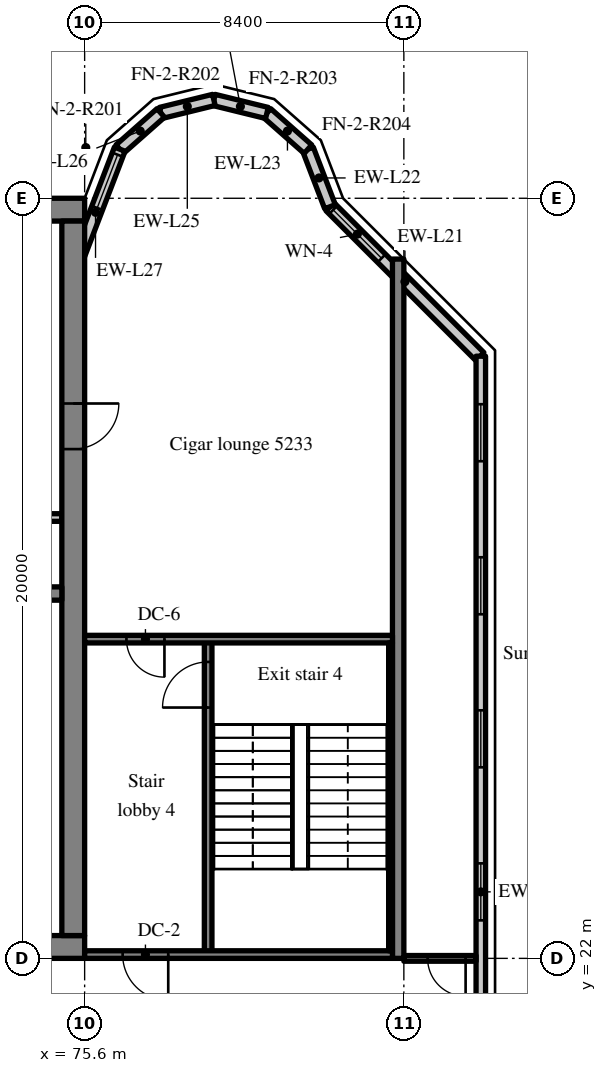
"""IFC4 building model, lengths in metres.
Left out: names, types, materials, properties, quantities, classifications, styles, units other than length and angle.
Written with IfcOpenShell. Run it as: python <this file> out.ifc"""

import sys

from ifc_helpers import new_model, si_unit, direction, frame, frame_2d, origin, place, context, subcontext, project, spatial, rectangle, extrude, source, transform, mapped, element, fill, save


model = new_model("IFC4")
c1 = context("Model", 3, precision=1e-05, world=origin(), true_north=direction((0.0, 1.0)))
c2 = subcontext(c1, "Body", "Model", "MODEL_VIEW")
j1 = project(units=[si_unit("LENGTHUNIT", "METRE"), si_unit("PLANEANGLEUNIT", "RADIAN")], contexts=[c1])
p1 = place(None, origin())
s1 = spatial("IfcSite", under=j1, at=p1, CompositionType="ELEMENT")
p2 = place(p1, origin())
s2 = spatial("IfcBuilding", under=s1, at=p2, CompositionType="ELEMENT")
p3 = place(p2, frame((0.0, 0.0, 217.9)))
s3 = spatial("IfcBuildingStorey", under=s2, at=p3, CompositionType="ELEMENT", Elevation=217.9)
m1 = source(origin(), c2, "Body", "SweptSolid", [
    extrude(rectangle(XDim=50.4, YDim=0.6, at=frame_2d((25.2, 0.0))), origin(), (0.0, 0.0, 1.0), 3.62),
])
p4 = place(p3, frame((25.2, 22.3, 0.0), z_axis=(0.0, 0.0, 1.0), x_axis=(1.0, 0.0, 0.0)))
e1 = element("IfcWall", 1, at=p4, inside=s3, PredefinedType="SHEAR", context=c2, shape_type="MappedRepresentation", body=[
    mapped(m1, transform((0.0, 0.0, 0.0), scale=1.0)),
])
m2 = source(origin(), c2, "Body", "SweptSolid", [
    extrude(rectangle(XDim=1.8, YDim=2.1, at=frame_2d((0.9, 1.05))), frame((0.0, 0.31, 0.0), z_axis=(0.0, -1.0, 0.0), x_axis=(1.0, 0.0, 0.0)), (0.0, 0.0, 1.0), 0.62),
])
p5 = place(p4, frame((15.9, 0.0, 0.0)))
e2 = element("IfcOpeningElement", 2, at=p5, cuts=e1, PredefinedType="OPENING", context=c2, shape_type="MappedRepresentation", body=[
    mapped(m2, transform((0.0, 0.0, 0.0), scale=1.0)),
])
m3 = source(origin(), c2, "Body", "SweptSolid", [
    extrude(rectangle(XDim=0.9, YDim=2.1, at=frame_2d((0.45, 1.05))), frame((0.0, 0.31, 0.0), z_axis=(0.0, -1.0, 0.0), x_axis=(1.0, 0.0, 0.0)), (0.0, 0.0, 1.0), 0.62),
])
p6 = place(p4, frame((9.687, 0.0, 0.0)))
e3 = element("IfcOpeningElement", 3, at=p6, cuts=e1, PredefinedType="OPENING", context=c2, shape_type="MappedRepresentation", body=[
    mapped(m3, transform((0.0, 0.0, 0.0), scale=1.0)),
])
p7 = place(p4, frame((21.513, 0.0, 0.0)))
e4 = element("IfcOpeningElement", 4, at=p7, cuts=e1, PredefinedType="OPENING", context=c2, shape_type="MappedRepresentation", body=[
    mapped(m3, transform((0.0, 0.0, 0.0), scale=1.0)),
])
p8 = place(p4, frame((32.7, 0.0, 0.0)))
e5 = element("IfcOpeningElement", 5, at=p8, cuts=e1, PredefinedType="OPENING", context=c2, shape_type="MappedRepresentation", body=[
    mapped(m2, transform((0.0, 0.0, 0.0), scale=1.0)),
])
m4 = source(origin(), c2, "Body", "SweptSolid", [
    extrude(rectangle(XDim=1.2, YDim=2.1, at=frame_2d((0.6, 1.05))), frame((0.0, 0.31, 0.0), z_axis=(0.0, -1.0, 0.0), x_axis=(1.0, 0.0, 0.0)), (0.0, 0.0, 1.0), 0.62),
])
p9 = place(p4, frame((6.488, 0.0, 0.0)))
e6 = element("IfcOpeningElement", 6, at=p9, cuts=e1, PredefinedType="OPENING", context=c2, shape_type="MappedRepresentation", body=[
    mapped(m4, transform((0.0, 0.0, 0.0), scale=1.0)),
])
p10 = place(p4, frame((47.925, 0.0, 0.0)))
e7 = element("IfcOpeningElement", 7, at=p10, cuts=e1, PredefinedType="OPENING", context=c2, shape_type="MappedRepresentation", body=[
    mapped(m4, transform((0.0, 0.0, 0.0), scale=1.0)),
])
p11 = place(p3, frame((25.2, 41.7, 0.0), z_axis=(0.0, 0.0, 1.0), x_axis=(1.0, 0.0, 0.0)))
e8 = element("IfcWall", 8, at=p11, inside=s3, PredefinedType="SHEAR", context=c2, shape_type="MappedRepresentation", body=[
    mapped(m1, transform((0.0, 0.0, 0.0), scale=1.0)),
])
m5 = source(origin(), c2, "Body", "SweptSolid", [
    extrude(rectangle(XDim=18.8, YDim=0.6, at=frame_2d((9.4, 0.0))), origin(), (0.0, 0.0, 1.0), 3.62),
])
p12 = place(p3, frame((75.3, 22.6, 0.0), z_axis=(0.0, 0.0, 1.0), x_axis=(0.0, 1.0, 0.0)))
e9 = element("IfcWall", 9, at=p12, inside=s3, PredefinedType="SHEAR", context=c2, shape_type="MappedRepresentation", body=[
    mapped(m5, transform((0.0, 0.0, 0.0), scale=1.0)),
])
p13 = place(p12, frame((12.8, 0.0, 0.0)))
e10 = element("IfcOpeningElement", 10, at=p13, cuts=e9, PredefinedType="OPENING", context=c2, shape_type="MappedRepresentation", body=[
    mapped(m4, transform((0.0, 0.0, 0.0), scale=1.0)),
])
m6 = source(origin(), c2, "Body", "SweptSolid", [
    extrude(rectangle(XDim=7.625, YDim=0.35, at=frame_2d((3.812, 0.0))), origin(), (0.0, 0.0, 1.0), 3.62),
])
p14 = place(p3, frame((67.375, 31.6, 0.0), z_axis=(0.0, 0.0, 1.0), x_axis=(1.0, 0.0, 0.0)))
e11 = element("IfcWall", 11, at=p14, inside=s3, PredefinedType="SHEAR", context=c2, shape_type="MappedRepresentation", body=[
    mapped(m6, transform((0.0, 0.0, 0.0), scale=1.0)),
])
m7 = source(origin(), c2, "Body", "SweptSolid", [
    extrude(rectangle(XDim=1.1, YDim=2.1, at=frame_2d((0.55, 1.05))), frame((0.0, 0.185, 0.0), z_axis=(0.0, -1.0, 0.0), x_axis=(1.0, 0.0, 0.0)), (0.0, 0.0, 1.0), 0.37),
])
p15 = place(p14, frame((5.8, 0.0, 0.0)))
e12 = element("IfcOpeningElement", 12, at=p15, cuts=e11, PredefinedType="OPENING", context=c2, shape_type="MappedRepresentation", body=[
    mapped(m7, transform((0.0, 0.0, 0.0), scale=1.0)),
])
m8 = source(origin(), c2, "Body", "SweptSolid", [
    extrude(rectangle(XDim=18.4, YDim=0.3, at=frame_2d((9.2, 0.0))), origin(), (0.0, 0.0, 1.0), 3.62),
])
p16 = place(p3, frame((83.85, 22.0, 0.0), z_axis=(0.0, 0.0, 1.0), x_axis=(0.0, 1.0, 0.0)))
e13 = element("IfcWall", 13, at=p16, inside=s3, PredefinedType="SHEAR", context=c2, shape_type="MappedRepresentation", body=[
    mapped(m8, transform((0.0, 0.0, 0.0), scale=1.0)),
])
m9 = source(origin(), c2, "Body", "SweptSolid", [
    extrude(rectangle(XDim=5.576, YDim=0.3, at=frame_2d((2.788, 0.0))), origin(), (0.0, 0.0, 1.0), 3.62),
])
p17 = place(p3, frame((86.0, 37.834, 0.0), z_axis=(0.0, 0.0, 1.0), x_axis=(-0.707106781187, 0.707106781187, 0.0)))
e14 = element("IfcWall", 14, at=p17, inside=s3, PredefinedType="SOLIDWALL", context=c2, shape_type="MappedRepresentation", body=[
    mapped(m9, transform((0.0, 0.0, 0.0), scale=1.0)),
])
m10 = source(origin(), c2, "Body", "SweptSolid", [
    extrude(rectangle(XDim=1.8, YDim=1.5, at=frame_2d((0.9, 0.75))), frame((0.0, 0.16, 0.0), z_axis=(0.0, -1.0, 0.0), x_axis=(1.0, 0.0, 0.0)), (0.0, 0.0, 1.0), 0.32),
])
p18 = place(p17, frame((3.658, 0.0, 0.9)))
e15 = element("IfcOpeningElement", 15, at=p18, cuts=e14, PredefinedType="OPENING", context=c2, shape_type="MappedRepresentation", body=[
    mapped(m10, transform((0.0, 0.0, 0.0), scale=1.0)),
])
m11 = source(origin(), c2, "Body", "SweptSolid", [
    extrude(rectangle(XDim=1.622, YDim=0.3, at=frame_2d((0.811, 0.0))), origin(), (0.0, 0.0, 1.0), 3.62),
])
p19 = place(p3, frame((82.057, 41.777, 0.0), z_axis=(0.0, 0.0, 1.0), x_axis=(-0.357778527068, 0.933806471154, 0.0)))
e16 = element("IfcWall", 16, at=p19, inside=s3, PredefinedType="SOLIDWALL", context=c2, shape_type="MappedRepresentation", body=[
    mapped(m11, transform((0.0, 0.0, 0.0), scale=1.0)),
])
m12 = source(origin(), c2, "Body", "SweptSolid", [
    extrude(rectangle(XDim=1.44, YDim=0.3, at=frame_2d((0.72, 0.0))), origin(), (0.0, 0.0, 1.0), 3.62),
])
p20 = place(p3, frame((81.477, 43.292, 0.0), z_axis=(0.0, 0.0, 1.0), x_axis=(-0.74957555648, 0.661918790432, 0.0)))
e17 = element("IfcWall", 17, at=p20, inside=s3, PredefinedType="SOLIDWALL", context=c2, shape_type="MappedRepresentation", body=[
    mapped(m12, transform((0.0, 0.0, 0.0), scale=1.0)),
])
m13 = source(origin(), c2, "Body", "SweptSolid", [
    extrude(rectangle(XDim=1.439, YDim=0.3, at=frame_2d((0.719, 0.0))), origin(), (0.0, 0.0, 1.0), 3.62),
])
for number, where, z_axis, x_axis in (
    (18, (80.397, 44.245, 0.0), (0.0, 0.0, 1.0), (-0.971, 0.238, 0.0)),
    (19, (79.0, 44.588, 0.0), (0.0, 0.0, 1.0), (-0.971, -0.238, 0.0)),
):
    element("IfcWall", number, at=place(p3, frame(where, z_axis=z_axis, x_axis=x_axis)), inside=s3, PredefinedType="SOLIDWALL", context=c2, shape_type="MappedRepresentation", body=[
        mapped(m13, transform((0.0, 0.0, 0.0), scale=1.0)),
    ])
p21 = place(p3, frame((77.603, 44.245, 0.0), z_axis=(0.0, 0.0, 1.0), x_axis=(-0.74957555648, -0.661918790432, 0.0)))
e20 = element("IfcWall", 20, at=p21, inside=s3, PredefinedType="SOLIDWALL", context=c2, shape_type="MappedRepresentation", body=[
    mapped(m12, transform((0.0, 0.0, 0.0), scale=1.0)),
])
m14 = source(origin(), c2, "Body", "SweptSolid", [
    extrude(rectangle(XDim=3.559, YDim=0.3, at=frame_2d((1.78, 0.0))), origin(), (0.0, 0.0, 1.0), 3.62),
])
p22 = place(p3, frame((76.523, 43.292, 0.0), z_axis=(0.0, 0.0, 1.0), x_axis=(-0.35779745313, -0.933799219604, 0.0)))
e21 = element("IfcWall", 21, at=p22, inside=s3, PredefinedType="SOLIDWALL", context=c2, shape_type="MappedRepresentation", body=[
    mapped(m14, transform((0.0, 0.0, 0.0), scale=1.0)),
])
m15 = source(origin(), c2, "Body", "SweptSolid", [
    extrude(rectangle(XDim=1.5, YDim=2.0, at=frame_2d((0.75, 1.0))), frame((0.0, 0.16, 0.0), z_axis=(0.0, -1.0, 0.0), x_axis=(1.0, 0.0, 0.0)), (0.0, 0.0, 1.0), 0.32),
])
p23 = place(p22, frame((0.156, 0.0, 0.9)))
e22 = element("IfcOpeningElement", 22, at=p23, cuts=e21, PredefinedType="OPENING", context=c2, shape_type="MappedRepresentation", body=[
    mapped(m15, transform((0.0, 0.0, 0.0), scale=1.0)),
])
m16 = source(origin(), c2, "Body", "SweptSolid", [
    extrude(rectangle(XDim=28.189, YDim=0.25, at=frame_2d((14.095, 0.0))), origin(), (0.0, 0.0, 1.0), 3.62),
])
p24 = place(p3, frame((86.025, 9.655, 0.0), z_axis=(0.0, 0.0, 1.0), x_axis=(0.0, 1.0, 0.0)))
e23 = element("IfcWall", 23, at=p24, inside=s3, PredefinedType="SOLIDWALL", context=c2, shape_type="MappedRepresentation", body=[
    mapped(m16, transform((0.0, 0.0, 0.0), scale=1.0)),
])
m17 = source(origin(), c2, "Body", "SweptSolid", [
    extrude(rectangle(XDim=1.5, YDim=1.5, at=frame_2d((0.75, 0.75))), frame((0.0, 0.135, 0.0), z_axis=(0.0, -1.0, 0.0), x_axis=(1.0, 0.0, 0.0)), (0.0, 0.0, 1.0), 0.27),
])
p25 = place(p24, frame((1.263, 0.0, 0.9)))
e24 = element("IfcOpeningElement", 24, at=p25, cuts=e23, PredefinedType="OPENING", context=c2, shape_type="MappedRepresentation", body=[
    mapped(m17, transform((0.0, 0.0, 0.0), scale=1.0)),
])
p26 = place(p24, frame((5.291, 0.0, 0.9)))
e25 = element("IfcOpeningElement", 25, at=p26, cuts=e23, PredefinedType="OPENING", context=c2, shape_type="MappedRepresentation", body=[
    mapped(m17, transform((0.0, 0.0, 0.0), scale=1.0)),
])
p27 = place(p24, frame((9.318, 0.0, 0.9)))
e26 = element("IfcOpeningElement", 26, at=p27, cuts=e23, PredefinedType="OPENING", context=c2, shape_type="MappedRepresentation", body=[
    mapped(m17, transform((0.0, 0.0, 0.0), scale=1.0)),
])
p28 = place(p24, frame((13.345, 0.0, 0.9)))
e27 = element("IfcOpeningElement", 27, at=p28, cuts=e23, PredefinedType="OPENING", context=c2, shape_type="MappedRepresentation", body=[
    mapped(m17, transform((0.0, 0.0, 0.0), scale=1.0)),
])
p29 = place(p24, frame((17.372, 0.0, 0.9)))
e28 = element("IfcOpeningElement", 28, at=p29, cuts=e23, PredefinedType="OPENING", context=c2, shape_type="MappedRepresentation", body=[
    mapped(m17, transform((0.0, 0.0, 0.0), scale=1.0)),
])
p30 = place(p24, frame((21.399, 0.0, 0.9)))
e29 = element("IfcOpeningElement", 29, at=p30, cuts=e23, PredefinedType="OPENING", context=c2, shape_type="MappedRepresentation", body=[
    mapped(m17, transform((0.0, 0.0, 0.0), scale=1.0)),
])
p31 = place(p24, frame((25.426, 0.0, 0.9)))
e30 = element("IfcOpeningElement", 30, at=p31, cuts=e23, PredefinedType="OPENING", context=c2, shape_type="MappedRepresentation", body=[
    mapped(m17, transform((0.0, 0.0, 0.0), scale=1.0)),
])
m18 = source(origin(), c2, "Body", "SweptSolid", [
    extrude(rectangle(XDim=2.55, YDim=0.2, at=frame_2d((1.275, 0.0))), origin(), (0.0, 0.0, 1.0), 3.62),
])
p32 = place(p3, frame((72.45, 33.6, 0.0), z_axis=(0.0, 0.0, 1.0), x_axis=(1.0, 0.0, 0.0)))
e31 = element("IfcWall", 31, at=p32, inside=s3, PredefinedType="SOLIDWALL", context=c2, shape_type="MappedRepresentation", body=[
    mapped(m18, transform((0.0, 0.0, 0.0), scale=1.0)),
])
m19 = source(origin(), c2, "Body", "SweptSolid", [
    extrude(rectangle(XDim=8.3, YDim=0.2, at=frame_2d((4.15, 0.0))), origin(), (0.0, 0.0, 1.0), 3.62),
])
p33 = place(p3, frame((78.85, 22.1, 0.0), z_axis=(0.0, 0.0, 1.0), x_axis=(0.0, 1.0, 0.0)))
e32 = element("IfcWall", 32, at=p33, inside=s3, PredefinedType="SOLIDWALL", context=c2, shape_type="MappedRepresentation", body=[
    mapped(m19, transform((0.0, 0.0, 0.0), scale=1.0)),
])
m20 = source(origin(), c2, "Body", "SweptSolid", [
    extrude(rectangle(XDim=1.2, YDim=2.1, at=frame_2d((0.6, 1.05))), frame((0.0, 0.11, 0.0), z_axis=(0.0, -1.0, 0.0), x_axis=(1.0, 0.0, 0.0)), (0.0, 0.0, 1.0), 0.22),
])
p34 = place(p33, frame((6.5, 0.0, 0.0)))
e33 = element("IfcOpeningElement", 33, at=p34, cuts=e32, PredefinedType="OPENING", context=c2, shape_type="MappedRepresentation", body=[
    mapped(m20, transform((0.0, 0.0, 0.0), scale=1.0)),
])
m21 = source(origin(), c2, "Body", "SweptSolid", [
    extrude(rectangle(XDim=8.1, YDim=0.2, at=frame_2d((4.05, 0.0))), origin(), (0.0, 0.0, 1.0), 3.62),
])
p35 = place(p3, frame((83.7, 22.1, 0.0), z_axis=(0.0, 0.0, 1.0), x_axis=(-1.0, 0.0, 0.0)))
e34 = element("IfcWall", 34, at=p35, inside=s3, PredefinedType="SOLIDWALL", context=c2, shape_type="MappedRepresentation", body=[
    mapped(m21, transform((0.0, 0.0, 0.0), scale=1.0)),
])
p36 = place(p35, frame((5.9, 0.0, 0.0)))
e35 = element("IfcOpeningElement", 35, at=p36, cuts=e34, PredefinedType="OPENING", context=c2, shape_type="MappedRepresentation", body=[
    mapped(m20, transform((0.0, 0.0, 0.0), scale=1.0)),
])
p37 = place(p3, frame((83.7, 30.4, 0.0), z_axis=(0.0, 0.0, 1.0), x_axis=(-1.0, 0.0, 0.0)))
e36 = element("IfcWall", 36, at=p37, inside=s3, PredefinedType="SOLIDWALL", context=c2, shape_type="MappedRepresentation", body=[
    mapped(m21, transform((0.0, 0.0, 0.0), scale=1.0)),
])
m22 = source(origin(), c2, "Body", "SweptSolid", [
    extrude(rectangle(XDim=1.0, YDim=2.1, at=frame_2d((0.5, 1.05))), frame((0.0, 0.11, 0.0), z_axis=(0.0, -1.0, 0.0), x_axis=(1.0, 0.0, 0.0)), (0.0, 0.0, 1.0), 0.22),
])
p38 = place(p37, frame((6.0, 0.0, 0.0)))
e37 = element("IfcOpeningElement", 37, at=p38, cuts=e36, PredefinedType="OPENING", context=c2, shape_type="MappedRepresentation", body=[
    mapped(m22, transform((0.0, 0.0, 0.0), scale=1.0)),
])
m23 = source(origin(), c2, "Body", "SweptSolid", [
    extrude(rectangle(XDim=8.1, YDim=0.1, at=frame_2d((4.05, 0.0))), origin(), (0.0, 0.0, 1.0), 3.62),
])
p39 = place(p3, frame((83.65, 22.2, 0.0), z_axis=(0.0, 0.0, 1.0), x_axis=(0.0, 1.0, 0.0)))
e38 = element("IfcWall", 38, at=p39, inside=s3, PredefinedType="SOLIDWALL", context=c2, shape_type="MappedRepresentation", body=[
    mapped(m23, transform((0.0, 0.0, 0.0), scale=1.0)),
])
m24 = source(origin(), c2, "Body", "SweptSolid", [
    extrude(rectangle(XDim=1.9, YDim=0.15, at=frame_2d((0.95, 0.0))), origin(), (0.0, 0.0, 1.0), 2.92),
])
p40 = place(p3, frame((84.0, 22.0, 0.0), z_axis=(0.0, 0.0, 1.0), x_axis=(1.0, 0.0, 0.0)))
e39 = element("IfcWall", 39, at=p40, inside=s3, PredefinedType="PARTITIONING", context=c2, shape_type="MappedRepresentation", body=[
    mapped(m24, transform((0.0, 0.0, 0.0), scale=1.0)),
])
m25 = source(origin(), c2, "Body", "SweptSolid", [
    extrude(rectangle(XDim=1.0, YDim=2.1, at=frame_2d((0.5, 1.05))), frame((0.0, 0.085, 0.0), z_axis=(0.0, -1.0, 0.0), x_axis=(1.0, 0.0, 0.0)), (0.0, 0.0, 1.0), 0.17),
])
p41 = place(p40, frame((0.625, 0.0, 0.0)))
e40 = element("IfcOpeningElement", 40, at=p41, cuts=e39, PredefinedType="OPENING", context=c2, shape_type="MappedRepresentation", body=[
    mapped(m25, transform((0.0, 0.0, 0.0), scale=1.0)),
])
m26 = source(origin(), c2, "Body", "SweptSolid", [
    extrude(rectangle(XDim=1.8, YDim=1.5, at=frame_2d((0.9, 0.75))), frame((0.0, 0.03, 0.0), z_axis=(0.0, -1.0, 0.0), x_axis=(1.0, 0.0, 0.0)), (0.0, 0.0, 1.0), 0.06),
])
p42 = place(p18, origin())
e41 = element("IfcWindow", 41, at=p42, inside=s3, PartitioningType="SINGLE_PANEL", PredefinedType="WINDOW", context=c2, shape_type="MappedRepresentation", body=[
    mapped(m26, transform((0.0, 0.0, 0.0), scale=1.0)),
])
fill(e15, e41)
m27 = source(origin(), c2, "Body", "SweptSolid", [
    extrude(rectangle(XDim=1.5, YDim=2.0, at=frame_2d((0.75, 1.0))), frame((0.0, 0.03, 0.0), z_axis=(0.0, -1.0, 0.0), x_axis=(1.0, 0.0, 0.0)), (0.0, 0.0, 1.0), 0.06),
])
p43 = place(p23, origin())
e42 = element("IfcWindow", 42, at=p43, inside=s3, PartitioningType="SINGLE_PANEL", PredefinedType="WINDOW", context=c2, shape_type="MappedRepresentation", body=[
    mapped(m27, transform((0.0, 0.0, 0.0), scale=1.0)),
])
fill(e22, e42)
m28 = source(origin(), c2, "Body", "SweptSolid", [
    extrude(rectangle(XDim=1.5, YDim=1.5, at=frame_2d((0.75, 0.75))), frame((0.0, 0.03, 0.0), z_axis=(0.0, -1.0, 0.0), x_axis=(1.0, 0.0, 0.0)), (0.0, 0.0, 1.0), 0.06),
])
p44 = place(p28, origin())
e43 = element("IfcWindow", 43, at=p44, inside=s3, PartitioningType="SINGLE_PANEL", PredefinedType="WINDOW", context=c2, shape_type="MappedRepresentation", body=[
    mapped(m28, transform((0.0, 0.0, 0.0), scale=1.0)),
])
fill(e27, e43)
p45 = place(p29, origin())
e44 = element("IfcWindow", 44, at=p45, inside=s3, PartitioningType="SINGLE_PANEL", PredefinedType="WINDOW", context=c2, shape_type="MappedRepresentation", body=[
    mapped(m28, transform((0.0, 0.0, 0.0), scale=1.0)),
])
fill(e28, e44)
p46 = place(p30, origin())
e45 = element("IfcWindow", 45, at=p46, inside=s3, PartitioningType="SINGLE_PANEL", PredefinedType="WINDOW", context=c2, shape_type="MappedRepresentation", body=[
    mapped(m28, transform((0.0, 0.0, 0.0), scale=1.0)),
])
fill(e29, e45)
p47 = place(p31, origin())
e46 = element("IfcWindow", 46, at=p47, inside=s3, PartitioningType="SINGLE_PANEL", PredefinedType="WINDOW", context=c2, shape_type="MappedRepresentation", body=[
    mapped(m28, transform((0.0, 0.0, 0.0), scale=1.0)),
])
fill(e30, e46)
m29 = source(origin(), c2, "Body", "SweptSolid", [
    extrude(rectangle(XDim=1.2, YDim=2.1, at=frame_2d((0.6, 1.05))), frame((0.0, 0.025, 0.0), z_axis=(0.0, -1.0, 0.0), x_axis=(1.0, 0.0, 0.0)), (0.0, 0.0, 1.0), 0.05),
])
p48 = place(p13, origin())
e47 = element("IfcDoor", 47, at=p48, inside=s3, OperationType="SINGLE_SWING_RIGHT", PredefinedType="DOOR", context=c2, shape_type="MappedRepresentation", body=[
    mapped(m29, transform((0.0, 0.0, 0.0), scale=1.0)),
])
fill(e10, e47)
p49 = place(p34, origin())
e48 = element("IfcDoor", 48, at=p49, inside=s3, OperationType="SINGLE_SWING_LEFT", PredefinedType="DOOR", context=c2, shape_type="MappedRepresentation", body=[
    mapped(m29, transform((0.0, 0.0, 0.0), scale=1.0)),
])
fill(e33, e48)
p50 = place(p36, origin())
e49 = element("IfcDoor", 49, at=p50, inside=s3, OperationType="SINGLE_SWING_LEFT", PredefinedType="DOOR", context=c2, shape_type="MappedRepresentation", body=[
    mapped(m29, transform((0.0, 0.0, 0.0), scale=1.0)),
])
fill(e35, e49)
m30 = source(origin(), c2, "Body", "SweptSolid", [
    extrude(rectangle(XDim=1.0, YDim=2.1, at=frame_2d((0.5, 1.05))), frame((0.0, 0.025, 0.0), z_axis=(0.0, -1.0, 0.0), x_axis=(1.0, 0.0, 0.0)), (0.0, 0.0, 1.0), 0.05),
])
p51 = place(p38, origin())
e50 = element("IfcDoor", 50, at=p51, inside=s3, OperationType="SINGLE_SWING_LEFT", PredefinedType="DOOR", context=c2, shape_type="MappedRepresentation", body=[
    mapped(m30, transform((0.0, 0.0, 0.0), scale=1.0)),
])
fill(e37, e50)
p52 = place(p41, origin())
e51 = element("IfcDoor", 51, at=p52, inside=s3, OperationType="SINGLE_SWING_RIGHT", PredefinedType="DOOR", context=c2, shape_type="MappedRepresentation", body=[
    mapped(m30, transform((0.0, 0.0, 0.0), scale=1.0)),
])
fill(e40, e51)
save(model, sys.argv[1])
